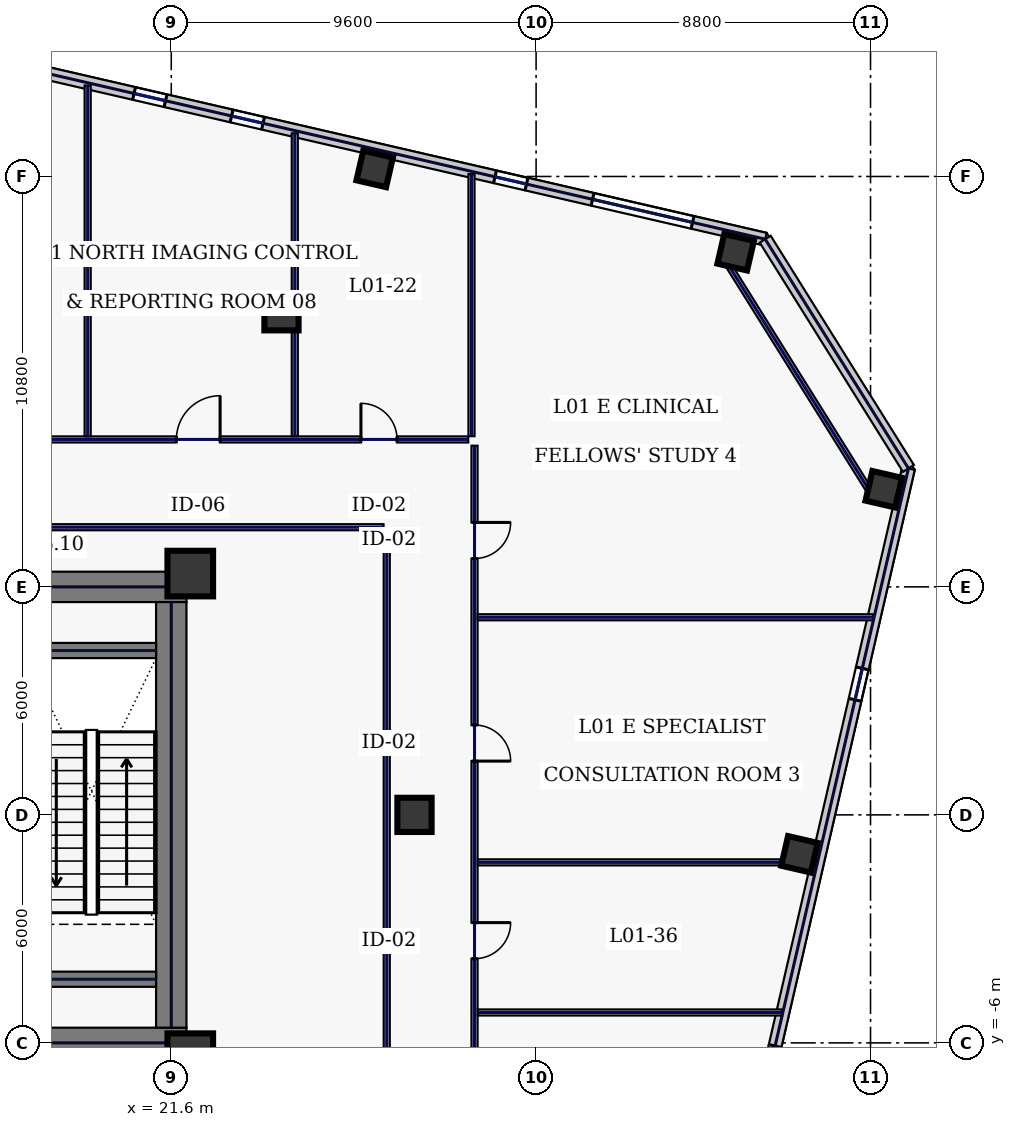
"""IFC4 building model, lengths in metres.
Left out: names, types, materials, properties, quantities, classifications, styles, units other than length and angle.
Written with IfcOpenShell. Run it as: python <this file> out.ifc"""

import sys

from ifc_helpers import new_model, si_unit, direction, frame, frame_2d, origin, origin_2d, place, context, subcontext, project, spatial, rectangle, hollow_rectangle, extrude, element, fill, save


model = new_model("IFC4")
c1 = context("Model", 3, precision=1e-05, world=origin(), true_north=direction((0.0, 1.0)))
c2 = subcontext(c1, "Body", "Model", "MODEL_VIEW")
j1 = project(units=[si_unit("LENGTHUNIT", "METRE"), si_unit("PLANEANGLEUNIT", "RADIAN")], contexts=[c1])
p1 = place(None, origin())
s1 = spatial("IfcSite", under=j1, at=p1, CompositionType="ELEMENT")
p2 = place(p1, origin())
s2 = spatial("IfcBuilding", under=s1, at=p2, CompositionType="ELEMENT")
p3 = place(p2, frame((0.0, 0.0, 8.4)))
s3 = spatial("IfcBuildingStorey", under=s2, at=p3, CompositionType="ELEMENT", Elevation=8.4)
for number, where, z_axis, x_axis in (
    (1, (10.4, 6.0, 0.0), (0.0, 0.0, 1.0), (1.0, 0.0, 0.0)),
    (2, (10.4, -6.0, 0.0), (0.0, 0.0, 1.0), (1.0, 0.0, 0.0)),
):
    element("IfcWall", number, at=place(p3, frame(where, z_axis=z_axis, x_axis=x_axis)), inside=s3, PredefinedType="SHEAR", context=c2, shape_type="SweptSolid", body=[
        extrude(rectangle(XDim=11.6, YDim=0.8, at=frame_2d((5.8, 0.0))), origin(), (0.0, 0.0, 1.0), 4.7),
    ])
p4 = place(p3, frame((21.6, -5.6, 0.0), z_axis=(0.0, 0.0, 1.0), x_axis=(0.0, 1.0, 0.0)))
e3 = element("IfcWall", 3, at=p4, inside=s3, PredefinedType="SHEAR", context=c2, shape_type="SweptSolid", body=[
    extrude(rectangle(XDim=11.2, YDim=0.8, at=frame_2d((5.6, 0.0))), origin(), (0.0, 0.0, 1.0), 4.7),
])
for number, where, z_axis, x_axis in (
    (4, (17.8, -4.325, 0.0), (0.0, 0.0, 1.0), (1.0, 0.0, 0.0)),
    (5, (17.8, 4.325, 0.0), (0.0, 0.0, 1.0), (1.0, 0.0, 0.0)),
):
    element("IfcWall", number, at=place(p3, frame(where, z_axis=z_axis, x_axis=x_axis)), inside=s3, PredefinedType="SHEAR", context=c2, shape_type="SweptSolid", body=[
        extrude(rectangle(XDim=3.4, YDim=0.4, at=frame_2d((1.7, 0.0))), origin(), (0.0, 0.0, 1.0), 4.7),
    ])
for number, where, z_axis, x_axis in (
    (6, (22.1, -6.35, 0.0), (0.0, 0.0, 1.0), (1.0, 0.0, 0.0)),
    (7, (22.1, 6.35, 0.0), (0.0, 0.0, 1.0), (1.0, 0.0, 0.0)),
):
    element("IfcColumn", number, at=place(p3, frame(where, z_axis=z_axis, x_axis=x_axis)), inside=s3, PredefinedType="COLUMN", context=c2, shape_type="SweptSolid", body=[
        extrude(hollow_rectangle(XDim=1.2, YDim=1.2, WallThickness=0.05, at=origin_2d()), origin(), (0.0, 0.0, 1.0), 4.7),
    ])
for number, where, z_axis, x_axis in (
    (8, (24.5, 13.2, 0.0), (0.0, 0.0, 1.0), (1.0, 0.0, 0.0)),
    (9, (28.0, 0.0, 0.0), (0.0, 0.0, 1.0), (1.0, 0.0, 0.0)),
):
    element("IfcColumn", number, at=place(p3, frame(where, z_axis=z_axis, x_axis=x_axis)), inside=s3, PredefinedType="COLUMN", context=c2, shape_type="SweptSolid", body=[
        extrude(hollow_rectangle(XDim=0.9, YDim=0.9, WallThickness=0.04, at=origin_2d()), origin(), (0.0, 0.0, 1.0), 4.7),
    ])
for number, where, z_axis, x_axis in (
    (10, (36.451, 14.806, 0.0), (0.0, 0.0, 1.0), (0.974, -0.225, 0.0)),
    (11, (26.952, 16.999, 0.0), (0.0, 0.0, 1.0), (0.974, -0.225, 0.0)),
    (12, (38.13, -1.038, 0.0), (0.0, 0.0, 1.0), (0.974, -0.225, 0.0)),
    (13, (40.348, 8.57, 0.0), (0.0, 0.0, 1.0), (0.974, -0.225, 0.0)),
):
    element("IfcColumn", number, at=place(p3, frame(where, z_axis=z_axis, x_axis=x_axis)), inside=s3, PredefinedType="COLUMN", context=c2, shape_type="SweptSolid", body=[
        extrude(hollow_rectangle(XDim=0.8, YDim=0.8, WallThickness=0.036, at=origin_2d()), origin(), (0.0, 0.0, 1.0), 4.7),
    ])
p5 = place(p3, frame((37.229, 15.15, 0.0), z_axis=(0.0, 0.0, 1.0), x_axis=(-0.97436993772, 0.224951604723, 0.0)))
e14 = element("IfcWall", 14, at=p5, inside=s3, PredefinedType="STANDARD", context=c2, shape_type="SweptSolid", body=[
    extrude(rectangle(XDim=22.651, YDim=0.34, at=frame_2d((11.326, 0.0))), origin(), (0.0, 0.0, 1.0), 4.7),
])
p6 = place(p5, frame((16.195, 0.0, 0.9)))
e15 = element("IfcOpeningElement", 15, at=p6, cuts=e14, PredefinedType="OPENING", context=c2, shape_type="SweptSolid", body=[
    extrude(rectangle(XDim=0.85, YDim=1.85, at=frame_2d((0.425, 0.925))), frame((0.0, 0.18, 0.0), z_axis=(0.0, -1.0, 0.0), x_axis=(1.0, 0.0, 0.0)), (0.0, 0.0, 1.0), 0.36),
])
p7 = place(p5, frame((13.561, 0.0, 0.9)))
e16 = element("IfcOpeningElement", 16, at=p7, cuts=e14, PredefinedType="OPENING", context=c2, shape_type="SweptSolid", body=[
    extrude(rectangle(XDim=0.85, YDim=1.85, at=frame_2d((0.425, 0.925))), frame((0.0, 0.18, 0.0), z_axis=(0.0, -1.0, 0.0), x_axis=(1.0, 0.0, 0.0)), (0.0, 0.0, 1.0), 0.36),
])
p8 = place(p5, frame((6.447, 0.0, 0.9)))
e17 = element("IfcOpeningElement", 17, at=p8, cuts=e14, PredefinedType="OPENING", context=c2, shape_type="SweptSolid", body=[
    extrude(rectangle(XDim=0.85, YDim=1.85, at=frame_2d((0.425, 0.925))), frame((0.0, 0.18, 0.0), z_axis=(0.0, -1.0, 0.0), x_axis=(1.0, 0.0, 0.0)), (0.0, 0.0, 1.0), 0.36),
])
p9 = place(p5, frame((1.962, 0.0, 0.9)))
e18 = element("IfcOpeningElement", 18, at=p9, cuts=e14, PredefinedType="OPENING", context=c2, shape_type="SweptSolid", body=[
    extrude(rectangle(XDim=2.7, YDim=2.2, at=frame_2d((1.35, 1.1))), frame((0.0, 0.18, 0.0), z_axis=(0.0, -1.0, 0.0), x_axis=(1.0, 0.0, 0.0)), (0.0, 0.0, 1.0), 0.36),
])
p10 = place(p3, frame((31.82, -30.637, 0.0), z_axis=(0.0, 0.0, 1.0), x_axis=(0.224949969076, 0.974370315338, 0.0)))
e19 = element("IfcWall", 19, at=p10, inside=s3, PredefinedType="STANDARD", context=c2, shape_type="SweptSolid", body=[
    extrude(rectangle(XDim=40.8, YDim=0.34, at=frame_2d((20.4, 0.0))), origin(), (0.0, 0.0, 1.0), 4.7),
])
p11 = place(p10, frame((4.3, 0.0, 0.58)))
e20 = element("IfcOpeningElement", 20, at=p11, cuts=e19, PredefinedType="OPENING", context=c2, shape_type="SweptSolid", body=[
    extrude(rectangle(XDim=1.6, YDim=2.3, at=frame_2d((0.8, 1.15))), frame((0.0, 0.18, 0.0), z_axis=(0.0, -1.0, 0.0), x_axis=(1.0, 0.0, 0.0)), (0.0, 0.0, 1.0), 0.36),
])
p12 = place(p10, frame((14.5, 0.0, 0.58)))
e21 = element("IfcOpeningElement", 21, at=p12, cuts=e19, PredefinedType="OPENING", context=c2, shape_type="SweptSolid", body=[
    extrude(rectangle(XDim=1.6, YDim=2.3, at=frame_2d((0.8, 1.15))), frame((0.0, 0.18, 0.0), z_axis=(0.0, -1.0, 0.0), x_axis=(1.0, 0.0, 0.0)), (0.0, 0.0, 1.0), 0.36),
])
p13 = place(p10, frame((24.35, 0.0, 0.75)))
e22 = element("IfcOpeningElement", 22, at=p13, cuts=e19, PredefinedType="OPENING", context=c2, shape_type="SweptSolid", body=[
    extrude(rectangle(XDim=0.85, YDim=1.85, at=frame_2d((0.425, 0.925))), frame((0.0, 0.18, 0.0), z_axis=(0.0, -1.0, 0.0), x_axis=(1.0, 0.0, 0.0)), (0.0, 0.0, 1.0), 0.36),
])
p14 = place(p10, frame((34.55, 0.0, 0.75)))
e23 = element("IfcOpeningElement", 23, at=p14, cuts=e19, PredefinedType="OPENING", context=c2, shape_type="SweptSolid", body=[
    extrude(rectangle(XDim=0.85, YDim=1.85, at=frame_2d((0.425, 0.925))), frame((0.0, 0.18, 0.0), z_axis=(0.0, -1.0, 0.0), x_axis=(1.0, 0.0, 0.0)), (0.0, 0.0, 1.0), 0.36),
])
p15 = place(p3, frame((40.998, 9.117, 0.0), z_axis=(0.0, 0.0, 1.0), x_axis=(-0.529921811158, 0.848046504656, 0.0)))
e24 = element("IfcWall", 24, at=p15, inside=s3, PredefinedType="STANDARD", context=c2, shape_type="SweptSolid", body=[
    extrude(rectangle(XDim=7.113, YDim=0.34, at=frame_2d((3.557, 0.0))), origin(), (0.0, 0.0, 1.0), 4.7),
])
p16 = place(p3, frame((40.06, 8.389, 0.0), z_axis=(0.0, 0.0, 1.0), x_axis=(-0.529927317139, 0.848043064089, 0.0)))
e25 = element("IfcWall", 25, at=p16, inside=s3, PredefinedType="PARTITIONING", context=c2, shape_type="SweptSolid", body=[
    extrude(rectangle(XDim=7.354, YDim=0.16, at=frame_2d((3.677, 0.0))), origin(), (0.0, 0.0, 1.0), 4.7),
])
p17 = place(p3, frame((-29.415, 9.88, 0.0), z_axis=(0.0, 0.0, 1.0), x_axis=(1.0, 0.0, 0.0)))
e26 = element("IfcWall", 26, at=p17, inside=s3, PredefinedType="PARTITIONING", context=c2, shape_type="SweptSolid", body=[
    extrude(rectangle(XDim=58.83, YDim=0.16, at=frame_2d((29.415, 0.0))), origin(), (0.0, 0.0, 1.0), 4.7),
])
p18 = place(p17, frame((2.044, 0.0, 0.0)))
e27 = element("IfcOpeningElement", 27, at=p18, cuts=e26, PredefinedType="OPENING", context=c2, shape_type="SweptSolid", body=[
    extrude(rectangle(XDim=1.15, YDim=2.2, at=frame_2d((0.575, 1.1))), frame((0.0, 0.09, 0.0), z_axis=(0.0, -1.0, 0.0), x_axis=(1.0, 0.0, 0.0)), (0.0, 0.0, 1.0), 0.18),
])
p19 = place(p17, frame((6.3, 0.0, 0.0)))
e28 = element("IfcOpeningElement", 28, at=p19, cuts=e26, PredefinedType="OPENING", context=c2, shape_type="SweptSolid", body=[
    extrude(rectangle(XDim=1.05, YDim=2.2, at=frame_2d((0.525, 1.1))), frame((0.0, 0.09, 0.0), z_axis=(0.0, -1.0, 0.0), x_axis=(1.0, 0.0, 0.0)), (0.0, 0.0, 1.0), 0.18),
])
p20 = place(p17, frame((11.775, 0.0, 0.0)))
e29 = element("IfcOpeningElement", 29, at=p20, cuts=e26, PredefinedType="OPENING", context=c2, shape_type="SweptSolid", body=[
    extrude(rectangle(XDim=0.95, YDim=2.2, at=frame_2d((0.475, 1.1))), frame((0.0, 0.09, 0.0), z_axis=(0.0, -1.0, 0.0), x_axis=(1.0, 0.0, 0.0)), (0.0, 0.0, 1.0), 0.18),
])
p21 = place(p17, frame((18.975, 0.0, 0.0)))
e30 = element("IfcOpeningElement", 30, at=p21, cuts=e26, PredefinedType="OPENING", context=c2, shape_type="SweptSolid", body=[
    extrude(rectangle(XDim=0.95, YDim=2.2, at=frame_2d((0.475, 1.1))), frame((0.0, 0.09, 0.0), z_axis=(0.0, -1.0, 0.0), x_axis=(1.0, 0.0, 0.0)), (0.0, 0.0, 1.0), 0.18),
])
p22 = place(p17, frame((27.125, 0.0, 0.0)))
e31 = element("IfcOpeningElement", 31, at=p22, cuts=e26, PredefinedType="OPENING", context=c2, shape_type="SweptSolid", body=[
    extrude(rectangle(XDim=0.95, YDim=2.2, at=frame_2d((0.475, 1.1))), frame((0.0, 0.09, 0.0), z_axis=(0.0, -1.0, 0.0), x_axis=(1.0, 0.0, 0.0)), (0.0, 0.0, 1.0), 0.18),
])
p23 = place(p17, frame((35.825, 0.0, 0.0)))
e32 = element("IfcOpeningElement", 32, at=p23, cuts=e26, PredefinedType="OPENING", context=c2, shape_type="SweptSolid", body=[
    extrude(rectangle(XDim=0.95, YDim=2.2, at=frame_2d((0.475, 1.1))), frame((0.0, 0.09, 0.0), z_axis=(0.0, -1.0, 0.0), x_axis=(1.0, 0.0, 0.0)), (0.0, 0.0, 1.0), 0.18),
])
p24 = place(p17, frame((44.325, 0.0, 0.0)))
e33 = element("IfcOpeningElement", 33, at=p24, cuts=e26, PredefinedType="OPENING", context=c2, shape_type="SweptSolid", body=[
    extrude(rectangle(XDim=1.05, YDim=2.2, at=frame_2d((0.525, 1.1))), frame((0.0, 0.09, 0.0), z_axis=(0.0, -1.0, 0.0), x_axis=(1.0, 0.0, 0.0)), (0.0, 0.0, 1.0), 0.18),
])
p25 = place(p17, frame((51.15, 0.0, 0.0)))
e34 = element("IfcOpeningElement", 34, at=p25, cuts=e26, PredefinedType="OPENING", context=c2, shape_type="SweptSolid", body=[
    extrude(rectangle(XDim=1.15, YDim=2.2, at=frame_2d((0.575, 1.1))), frame((0.0, 0.09, 0.0), z_axis=(0.0, -1.0, 0.0), x_axis=(1.0, 0.0, 0.0)), (0.0, 0.0, 1.0), 0.18),
])
p26 = place(p17, frame((56.006, 0.0, 0.0)))
e35 = element("IfcOpeningElement", 35, at=p26, cuts=e26, PredefinedType="OPENING", context=c2, shape_type="SweptSolid", body=[
    extrude(rectangle(XDim=0.95, YDim=2.2, at=frame_2d((0.475, 1.1))), frame((0.0, 0.09, 0.0), z_axis=(0.0, -1.0, 0.0), x_axis=(1.0, 0.0, 0.0)), (0.0, 0.0, 1.0), 0.18),
])
p27 = place(p3, frame((29.58, 9.715, 0.0), z_axis=(0.0, 0.0, 1.0), x_axis=(0.0, -1.0, 0.0)))
e36 = element("IfcWall", 36, at=p27, inside=s3, PredefinedType="PARTITIONING", context=c2, shape_type="SweptSolid", body=[
    extrude(rectangle(XDim=19.43, YDim=0.16, at=frame_2d((9.715, 0.0))), origin(), (0.0, 0.0, 1.0), 4.7),
])
p28 = place(p27, frame((16.631, 0.0, 0.0)))
e37 = element("IfcOpeningElement", 37, at=p28, cuts=e36, PredefinedType="OPENING", context=c2, shape_type="SweptSolid", body=[
    extrude(rectangle(XDim=0.95, YDim=2.2, at=frame_2d((0.475, 1.1))), frame((0.0, 0.09, 0.0), z_axis=(0.0, -1.0, 0.0), x_axis=(1.0, 0.0, 0.0)), (0.0, 0.0, 1.0), 0.18),
])
p29 = place(p27, frame((12.55, 0.0, 0.0)))
e38 = element("IfcOpeningElement", 38, at=p29, cuts=e36, PredefinedType="OPENING", context=c2, shape_type="SweptSolid", body=[
    extrude(rectangle(XDim=0.95, YDim=2.2, at=frame_2d((0.475, 1.1))), frame((0.0, 0.09, 0.0), z_axis=(0.0, -1.0, 0.0), x_axis=(1.0, 0.0, 0.0)), (0.0, 0.0, 1.0), 0.18),
])
p30 = place(p27, frame((7.35, 0.0, 0.0)))
e39 = element("IfcOpeningElement", 39, at=p30, cuts=e36, PredefinedType="OPENING", context=c2, shape_type="SweptSolid", body=[
    extrude(rectangle(XDim=0.95, YDim=2.2, at=frame_2d((0.475, 1.1))), frame((0.0, 0.09, 0.0), z_axis=(0.0, -1.0, 0.0), x_axis=(1.0, 0.0, 0.0)), (0.0, 0.0, 1.0), 0.18),
])
p31 = place(p27, frame((2.019, 0.0, 0.0)))
e40 = element("IfcOpeningElement", 40, at=p31, cuts=e36, PredefinedType="OPENING", context=c2, shape_type="SweptSolid", body=[
    extrude(rectangle(XDim=0.95, YDim=2.2, at=frame_2d((0.475, 1.1))), frame((0.0, 0.09, 0.0), z_axis=(0.0, -1.0, 0.0), x_axis=(1.0, 0.0, 0.0)), (0.0, 0.0, 1.0), 0.18),
])
p32 = place(p3, frame((27.185, 7.57, 0.0), z_axis=(0.0, 0.0, 1.0), x_axis=(-1.0, 0.0, 0.0)))
e41 = element("IfcWall", 41, at=p32, inside=s3, PredefinedType="PARTITIONING", context=c2, shape_type="SweptSolid", body=[
    extrude(rectangle(XDim=16.52, YDim=0.16, at=frame_2d((8.26, 0.0))), origin(), (0.0, 0.0, 1.0), 4.7),
])
p33 = place(p3, frame((27.27, -7.485, 0.0), z_axis=(0.0, 0.0, 1.0), x_axis=(0.0, 1.0, 0.0)))
e42 = element("IfcWall", 42, at=p33, inside=s3, PredefinedType="PARTITIONING", context=c2, shape_type="SweptSolid", body=[
    extrude(rectangle(XDim=14.97, YDim=0.16, at=frame_2d((7.485, 0.0))), origin(), (0.0, 0.0, 1.0), 4.7),
])
p34 = place(p3, frame((29.5, 9.965, 0.0), z_axis=(0.0, 0.0, 1.0), x_axis=(0.0, 1.0, 0.0)))
e43 = element("IfcWall", 43, at=p34, inside=s3, PredefinedType="PARTITIONING", context=c2, shape_type="SweptSolid", body=[
    extrude(rectangle(XDim=6.897, YDim=0.16, at=frame_2d((3.449, 0.0))), origin(), (0.0, 0.0, 1.0), 4.7),
])
p35 = place(p3, frame((19.4, 9.965, 0.0), z_axis=(0.0, 0.0, 1.0), x_axis=(0.0, 1.0, 0.0)))
e44 = element("IfcWall", 44, at=p35, inside=s3, PredefinedType="PARTITIONING", context=c2, shape_type="SweptSolid", body=[
    extrude(rectangle(XDim=9.229, YDim=0.16, at=frame_2d((4.615, 0.0))), origin(), (0.0, 0.0, 1.0), 4.7),
])
p36 = place(p3, frame((24.85, 9.965, 0.0), z_axis=(0.0, 0.0, 1.0), x_axis=(0.0, 1.0, 0.0)))
e45 = element("IfcWall", 45, at=p36, inside=s3, PredefinedType="PARTITIONING", context=c2, shape_type="SweptSolid", body=[
    extrude(rectangle(XDim=7.971, YDim=0.16, at=frame_2d((3.985, 0.0))), origin(), (0.0, 0.0, 1.0), 4.7),
])
p37 = place(p3, frame((29.665, -5.2, 0.0), z_axis=(0.0, 0.0, 1.0), x_axis=(1.0, 0.0, 0.0)))
e46 = element("IfcWall", 46, at=p37, inside=s3, PredefinedType="PARTITIONING", context=c2, shape_type="SweptSolid", body=[
    extrude(rectangle(XDim=8.007, YDim=0.16, at=frame_2d((4.003, 0.0))), origin(), (0.0, 0.0, 1.0), 4.7),
])
p38 = place(p3, frame((29.665, -1.25, 0.0), z_axis=(0.0, 0.0, 1.0), x_axis=(1.0, 0.0, 0.0)))
e47 = element("IfcWall", 47, at=p38, inside=s3, PredefinedType="PARTITIONING", context=c2, shape_type="SweptSolid", body=[
    extrude(rectangle(XDim=8.919, YDim=0.16, at=frame_2d((4.459, 0.0))), origin(), (0.0, 0.0, 1.0), 4.7),
])
p39 = place(p3, frame((29.665, 5.2, 0.0), z_axis=(0.0, 0.0, 1.0), x_axis=(1.0, 0.0, 0.0)))
e48 = element("IfcWall", 48, at=p39, inside=s3, PredefinedType="PARTITIONING", context=c2, shape_type="SweptSolid", body=[
    extrude(rectangle(XDim=10.408, YDim=0.16, at=frame_2d((5.204, 0.0))), origin(), (0.0, 0.0, 1.0), 4.7),
])
p40 = place(p6, origin())
e49 = element("IfcWindow", 49, at=p40, inside=s3, PartitioningType="SINGLE_PANEL", PredefinedType="WINDOW", context=c2, shape_type="SweptSolid", body=[
    extrude(rectangle(XDim=0.85, YDim=1.85, at=frame_2d((0.425, 0.925))), frame((0.0, 0.03, 0.0), z_axis=(0.0, -1.0, 0.0), x_axis=(1.0, 0.0, 0.0)), (0.0, 0.0, 1.0), 0.06),
])
fill(e15, e49)
p41 = place(p7, origin())
e50 = element("IfcWindow", 50, at=p41, inside=s3, PartitioningType="SINGLE_PANEL", PredefinedType="WINDOW", context=c2, shape_type="SweptSolid", body=[
    extrude(rectangle(XDim=0.85, YDim=1.85, at=frame_2d((0.425, 0.925))), frame((0.0, 0.03, 0.0), z_axis=(0.0, -1.0, 0.0), x_axis=(1.0, 0.0, 0.0)), (0.0, 0.0, 1.0), 0.06),
])
fill(e16, e50)
p42 = place(p8, origin())
e51 = element("IfcWindow", 51, at=p42, inside=s3, PartitioningType="SINGLE_PANEL", PredefinedType="WINDOW", context=c2, shape_type="SweptSolid", body=[
    extrude(rectangle(XDim=0.85, YDim=1.85, at=frame_2d((0.425, 0.925))), frame((0.0, 0.03, 0.0), z_axis=(0.0, -1.0, 0.0), x_axis=(1.0, 0.0, 0.0)), (0.0, 0.0, 1.0), 0.06),
])
fill(e17, e51)
p43 = place(p9, origin())
e52 = element("IfcWindow", 52, at=p43, inside=s3, PartitioningType="SINGLE_PANEL", PredefinedType="WINDOW", context=c2, shape_type="SweptSolid", body=[
    extrude(rectangle(XDim=2.7, YDim=2.2, at=frame_2d((1.35, 1.1))), frame((0.0, 0.03, 0.0), z_axis=(0.0, -1.0, 0.0), x_axis=(1.0, 0.0, 0.0)), (0.0, 0.0, 1.0), 0.06),
])
fill(e18, e52)
p44 = place(p13, origin())
e53 = element("IfcWindow", 53, at=p44, inside=s3, PartitioningType="SINGLE_PANEL", PredefinedType="WINDOW", context=c2, shape_type="SweptSolid", body=[
    extrude(rectangle(XDim=0.85, YDim=1.85, at=frame_2d((0.425, 0.925))), frame((0.0, 0.03, 0.0), z_axis=(0.0, -1.0, 0.0), x_axis=(1.0, 0.0, 0.0)), (0.0, 0.0, 1.0), 0.06),
])
fill(e22, e53)
p45 = place(p14, origin())
e54 = element("IfcWindow", 54, at=p45, inside=s3, PartitioningType="SINGLE_PANEL", PredefinedType="WINDOW", context=c2, shape_type="SweptSolid", body=[
    extrude(rectangle(XDim=0.85, YDim=1.85, at=frame_2d((0.425, 0.925))), frame((0.0, 0.03, 0.0), z_axis=(0.0, -1.0, 0.0), x_axis=(1.0, 0.0, 0.0)), (0.0, 0.0, 1.0), 0.06),
])
fill(e23, e54)
p46 = place(p25, origin())
e55 = element("IfcDoor", 55, at=p46, inside=s3, OperationType="SINGLE_SWING_RIGHT", PredefinedType="DOOR", context=c2, shape_type="SweptSolid", body=[
    extrude(rectangle(XDim=1.15, YDim=2.2, at=frame_2d((0.575, 1.1))), frame((0.0, 0.025, 0.0), z_axis=(0.0, -1.0, 0.0), x_axis=(1.0, 0.0, 0.0)), (0.0, 0.0, 1.0), 0.05),
])
fill(e34, e55)
p47 = place(p26, origin())
e56 = element("IfcDoor", 56, at=p47, inside=s3, OperationType="SINGLE_SWING_LEFT", PredefinedType="DOOR", context=c2, shape_type="SweptSolid", body=[
    extrude(rectangle(XDim=0.95, YDim=2.2, at=frame_2d((0.475, 1.1))), frame((0.0, 0.025, 0.0), z_axis=(0.0, -1.0, 0.0), x_axis=(1.0, 0.0, 0.0)), (0.0, 0.0, 1.0), 0.05),
])
fill(e35, e56)
p48 = place(p29, origin())
e57 = element("IfcDoor", 57, at=p48, inside=s3, OperationType="SINGLE_SWING_LEFT", PredefinedType="DOOR", context=c2, shape_type="SweptSolid", body=[
    extrude(rectangle(XDim=0.95, YDim=2.2, at=frame_2d((0.475, 1.1))), frame((0.0, 0.025, 0.0), z_axis=(0.0, -1.0, 0.0), x_axis=(1.0, 0.0, 0.0)), (0.0, 0.0, 1.0), 0.05),
])
fill(e38, e57)
p49 = place(p30, origin())
e58 = element("IfcDoor", 58, at=p49, inside=s3, OperationType="SINGLE_SWING_RIGHT", PredefinedType="DOOR", context=c2, shape_type="SweptSolid", body=[
    extrude(rectangle(XDim=0.95, YDim=2.2, at=frame_2d((0.475, 1.1))), frame((0.0, 0.025, 0.0), z_axis=(0.0, -1.0, 0.0), x_axis=(1.0, 0.0, 0.0)), (0.0, 0.0, 1.0), 0.05),
])
fill(e39, e58)
p50 = place(p31, origin())
e59 = element("IfcDoor", 59, at=p50, inside=s3, OperationType="SINGLE_SWING_LEFT", PredefinedType="DOOR", context=c2, shape_type="SweptSolid", body=[
    extrude(rectangle(XDim=0.95, YDim=2.2, at=frame_2d((0.475, 1.1))), frame((0.0, 0.025, 0.0), z_axis=(0.0, -1.0, 0.0), x_axis=(1.0, 0.0, 0.0)), (0.0, 0.0, 1.0), 0.05),
])
fill(e40, e59)
save(model, sys.argv[1])
